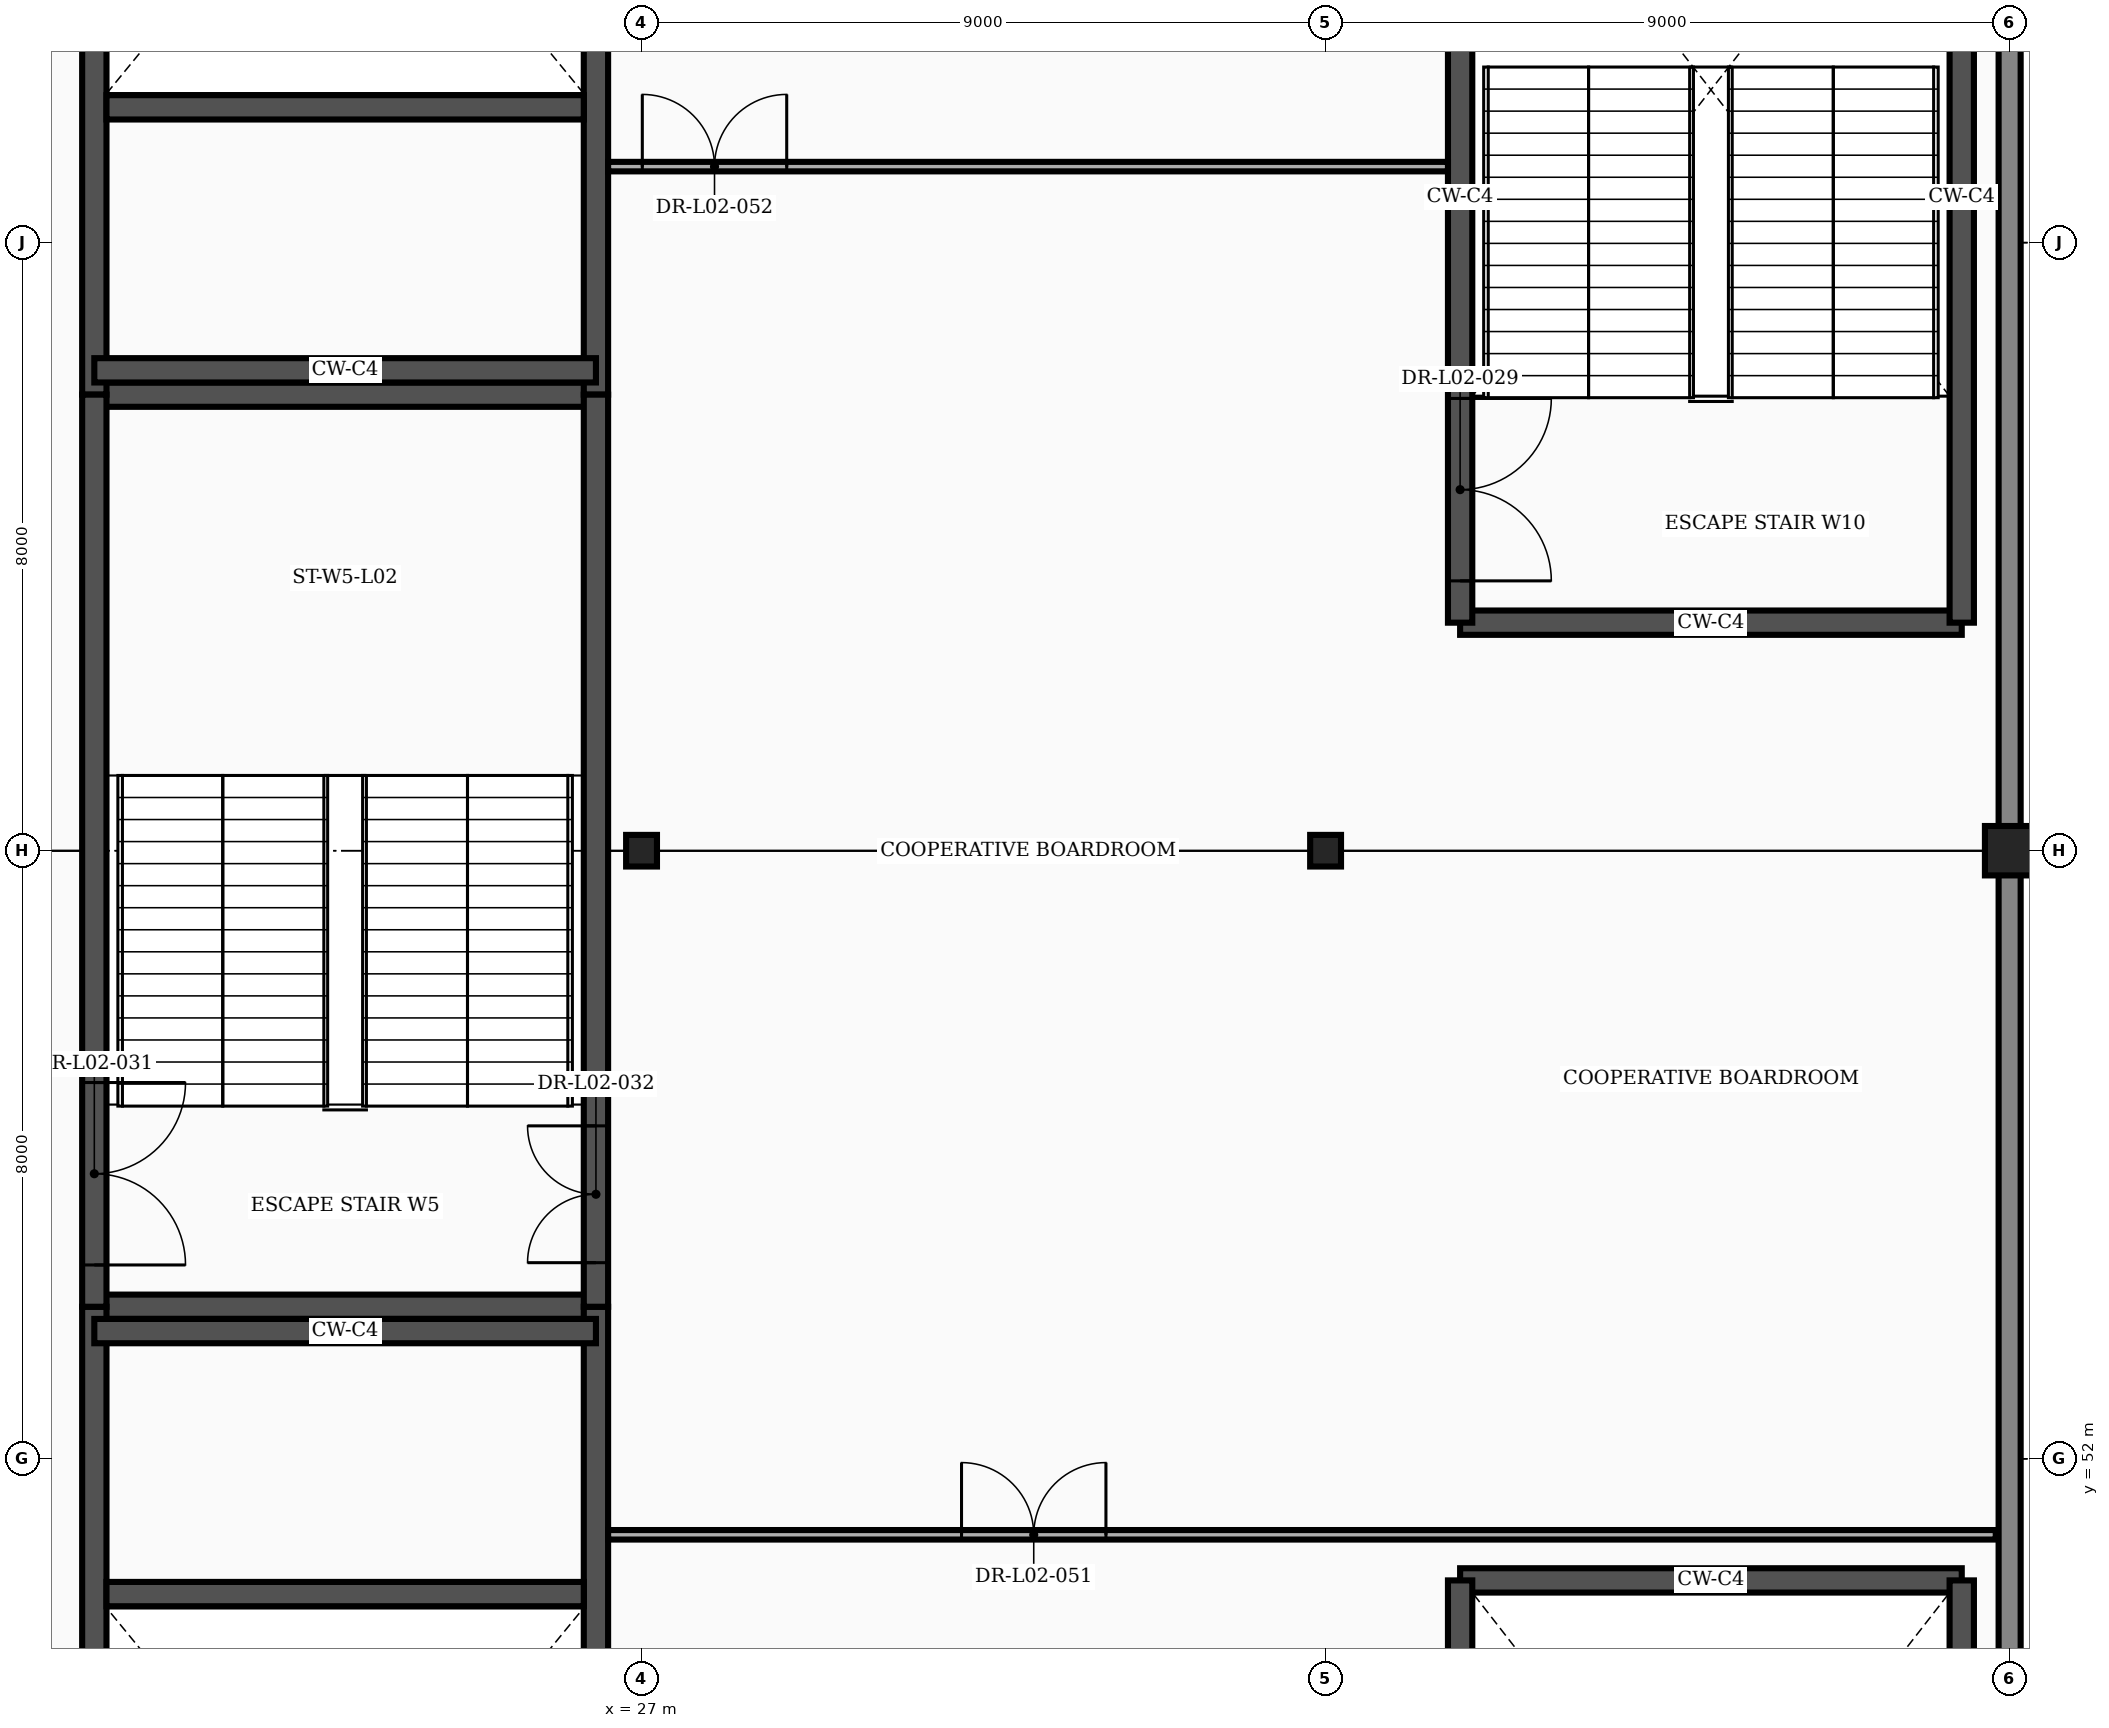
"""IFC4 building model, lengths in metres.
Left out: names, types, materials, properties, quantities, classifications, styles, units other than length and angle.
Written with IfcOpenShell. Run it as: python <this file> out.ifc"""

import sys

from ifc_helpers import new_model, si_unit, direction, frame, frame_2d, origin, origin_2d, place, context, subcontext, project, spatial, rectangle, i_section, extrude, element, fill, save


model = new_model("IFC4")
c1 = context("Model", 3, precision=1e-05, world=origin(), true_north=direction((0.0, 1.0)))
c2 = subcontext(c1, "Body", "Model", "MODEL_VIEW")
j1 = project(units=[si_unit("LENGTHUNIT", "METRE"), si_unit("PLANEANGLEUNIT", "RADIAN")], contexts=[c1])
p1 = place(None, origin())
s1 = spatial("IfcSite", under=j1, at=p1, CompositionType="ELEMENT")
p2 = place(p1, origin())
s2 = spatial("IfcBuilding", under=s1, at=p2, CompositionType="ELEMENT")
p3 = place(p2, frame((0.0, 0.0, 11.4)))
s3 = spatial("IfcBuildingStorey", under=s2, at=p3, CompositionType="ELEMENT", Elevation=11.4)
p4 = place(p3, frame((27.0, 60.0, 0.0), z_axis=(0.0, 0.0, 1.0), x_axis=(1.0, 0.0, 0.0)))
e1 = element("IfcColumn", 1, at=p4, inside=s3, PredefinedType="COLUMN", context=c2, shape_type="SweptSolid", body=[
    extrude(i_section(OverallWidth=0.406, OverallDepth=0.416, WebThickness=0.03, FlangeThickness=0.048, at=origin_2d()), origin(), (0.0, 0.0, 1.0), 5.4),
])
p5 = place(p3, frame((45.0, 60.0, 0.0), z_axis=(0.0, 0.0, 1.0), x_axis=(1.0, 0.0, 0.0)))
e2 = element("IfcColumn", 2, at=p5, inside=s3, PredefinedType="COLUMN", context=c2, shape_type="SweptSolid", body=[
    extrude(rectangle(XDim=0.65, YDim=0.65, at=origin_2d()), origin(), (0.0, 0.0, 1.0), 5.4),
])
p6 = place(p3, frame((36.0, 60.0, 0.0), z_axis=(0.0, 0.0, 1.0), x_axis=(1.0, 0.0, 0.0)))
e3 = element("IfcColumn", 3, at=p6, inside=s3, PredefinedType="COLUMN", context=c2, shape_type="SweptSolid", body=[
    extrude(i_section(OverallWidth=0.406, OverallDepth=0.416, WebThickness=0.03, FlangeThickness=0.048, at=origin_2d()), origin(), (0.0, 0.0, 1.0), 5.4),
])
for number, where, z_axis, x_axis in (
    (4, (45.0, 36.198, 0.0), (0.0, 0.0, 1.0), (0.0, 1.0, 0.0)),
    (5, (45.0, 60.317, 0.0), (0.0, 0.0, 1.0), (0.0, 1.0, 0.0)),
):
    element("IfcWall", number, at=place(p3, frame(where, z_axis=z_axis, x_axis=x_axis)), inside=s3, PredefinedType="STANDARD", context=c2, shape_type="SweptSolid", body=[
        extrude(rectangle(XDim=23.485, YDim=0.29, at=frame_2d((11.742, 0.0))), origin(), (0.0, 0.0, 1.0), 4.467),
    ])
p7 = place(p3, frame((19.8, 54.0, 0.0), z_axis=(0.0, 0.0, 1.0), x_axis=(1.0, 0.0, 0.0)))
e6 = element("IfcWall", 6, at=p7, inside=s3, PredefinedType="SHEAR", context=c2, shape_type="SweptSolid", body=[
    extrude(rectangle(XDim=6.6, YDim=0.32, at=frame_2d((3.3, 0.0))), origin(), (0.0, 0.0, 1.0), 5.15),
])
p8 = place(p3, frame((19.8, 39.4, 0.0), z_axis=(0.0, 0.0, 1.0), x_axis=(0.0, 1.0, 0.0)))
e7 = element("IfcWall", 7, at=p8, inside=s3, PredefinedType="SHEAR", context=c2, shape_type="SweptSolid", body=[
    extrude(rectangle(XDim=14.6, YDim=0.32, at=frame_2d((7.3, 0.0))), origin(), (0.0, 0.0, 1.0), 5.15),
])
p9 = place(p8, frame((0.55, 0.0, 0.0)))
e8 = element("IfcOpeningElement", 8, at=p9, cuts=e7, PredefinedType="OPENING", context=c2, shape_type="SweptSolid", body=[
    extrude(rectangle(XDim=2.4, YDim=2.25, at=frame_2d((1.2, 1.125))), frame((0.0, 0.172, 0.0), z_axis=(0.0, -1.0, 0.0), x_axis=(1.0, 0.0, 0.0)), (0.0, 0.0, 1.0), 0.344),
])
p10 = place(p3, frame((26.4, 39.4, 0.0), z_axis=(0.0, 0.0, 1.0), x_axis=(0.0, 1.0, 0.0)))
e9 = element("IfcWall", 9, at=p10, inside=s3, PredefinedType="SHEAR", context=c2, shape_type="SweptSolid", body=[
    extrude(rectangle(XDim=14.6, YDim=0.32, at=frame_2d((7.3, 0.0))), origin(), (0.0, 0.0, 1.0), 5.15),
])
p11 = place(p3, frame((19.96, 50.22, 0.0), z_axis=(0.0, 0.0, 1.0), x_axis=(1.0, 0.0, 0.0)))
e10 = element("IfcWall", 10, at=p11, inside=s3, PredefinedType="SHEAR", context=c2, shape_type="SweptSolid", body=[
    extrude(rectangle(XDim=6.28, YDim=0.32, at=frame_2d((3.14, 0.0))), origin(), (0.0, 0.0, 1.0), 5.15),
])
p12 = place(p3, frame((19.8, 66.0, 0.0), z_axis=(0.0, 0.0, 1.0), x_axis=(1.0, 0.0, 0.0)))
e11 = element("IfcWall", 11, at=p12, inside=s3, PredefinedType="SHEAR", context=c2, shape_type="SweptSolid", body=[
    extrude(rectangle(XDim=6.6, YDim=0.32, at=frame_2d((3.3, 0.0))), origin(), (0.0, 0.0, 1.0), 5.15),
])
p13 = place(p3, frame((19.8, 66.0, 0.0), z_axis=(0.0, 0.0, 1.0), x_axis=(0.0, 1.0, 0.0)))
e12 = element("IfcWall", 12, at=p13, inside=s3, PredefinedType="SHEAR", context=c2, shape_type="SweptSolid", body=[
    extrude(rectangle(XDim=14.6, YDim=0.32, at=frame_2d((7.3, 0.0))), origin(), (0.0, 0.0, 1.0), 5.15),
])
p14 = place(p13, frame((11.65, 0.0, 0.0)))
e13 = element("IfcOpeningElement", 13, at=p14, cuts=e12, PredefinedType="OPENING", context=c2, shape_type="SweptSolid", body=[
    extrude(rectangle(XDim=2.4, YDim=2.25, at=frame_2d((1.2, 1.125))), frame((0.0, 0.172, 0.0), z_axis=(0.0, -1.0, 0.0), x_axis=(1.0, 0.0, 0.0)), (0.0, 0.0, 1.0), 0.344),
])
p15 = place(p3, frame((26.4, 66.0, 0.0), z_axis=(0.0, 0.0, 1.0), x_axis=(0.0, 1.0, 0.0)))
e14 = element("IfcWall", 14, at=p15, inside=s3, PredefinedType="SHEAR", context=c2, shape_type="SweptSolid", body=[
    extrude(rectangle(XDim=14.6, YDim=0.32, at=frame_2d((7.3, 0.0))), origin(), (0.0, 0.0, 1.0), 5.15),
])
p16 = place(p3, frame((19.96, 69.78, 0.0), z_axis=(0.0, 0.0, 1.0), x_axis=(1.0, 0.0, 0.0)))
e15 = element("IfcWall", 15, at=p16, inside=s3, PredefinedType="SHEAR", context=c2, shape_type="SweptSolid", body=[
    extrude(rectangle(XDim=6.28, YDim=0.32, at=frame_2d((3.14, 0.0))), origin(), (0.0, 0.0, 1.0), 5.15),
])
p17 = place(p3, frame((37.77, 50.4, 0.0), z_axis=(0.0, 0.0, 1.0), x_axis=(1.0, 0.0, 0.0)))
e16 = element("IfcWall", 16, at=p17, inside=s3, PredefinedType="SHEAR", context=c2, shape_type="SweptSolid", body=[
    extrude(rectangle(XDim=6.6, YDim=0.32, at=frame_2d((3.3, 0.0))), origin(), (0.0, 0.0, 1.0), 5.15),
])
p18 = place(p3, frame((37.77, 39.2, 0.0), z_axis=(0.0, 0.0, 1.0), x_axis=(0.0, 1.0, 0.0)))
e17 = element("IfcWall", 17, at=p18, inside=s3, PredefinedType="SHEAR", context=c2, shape_type="SweptSolid", body=[
    extrude(rectangle(XDim=11.2, YDim=0.32, at=frame_2d((5.6, 0.0))), origin(), (0.0, 0.0, 1.0), 5.15),
])
p19 = place(p18, frame((0.55, 0.0, 0.0)))
e18 = element("IfcOpeningElement", 18, at=p19, cuts=e17, PredefinedType="OPENING", context=c2, shape_type="SweptSolid", body=[
    extrude(rectangle(XDim=2.4, YDim=2.25, at=frame_2d((1.2, 1.125))), frame((0.0, 0.172, 0.0), z_axis=(0.0, -1.0, 0.0), x_axis=(1.0, 0.0, 0.0)), (0.0, 0.0, 1.0), 0.344),
])
p20 = place(p3, frame((44.37, 39.2, 0.0), z_axis=(0.0, 0.0, 1.0), x_axis=(0.0, 1.0, 0.0)))
e19 = element("IfcWall", 19, at=p20, inside=s3, PredefinedType="SHEAR", context=c2, shape_type="SweptSolid", body=[
    extrude(rectangle(XDim=11.2, YDim=0.32, at=frame_2d((5.6, 0.0))), origin(), (0.0, 0.0, 1.0), 5.15),
])
p21 = place(p3, frame((37.77, 63.0, 0.0), z_axis=(0.0, 0.0, 1.0), x_axis=(1.0, 0.0, 0.0)))
e20 = element("IfcWall", 20, at=p21, inside=s3, PredefinedType="SHEAR", context=c2, shape_type="SweptSolid", body=[
    extrude(rectangle(XDim=6.6, YDim=0.32, at=frame_2d((3.3, 0.0))), origin(), (0.0, 0.0, 1.0), 5.15),
])
p22 = place(p3, frame((37.77, 63.0, 0.0), z_axis=(0.0, 0.0, 1.0), x_axis=(0.0, 1.0, 0.0)))
e21 = element("IfcWall", 21, at=p22, inside=s3, PredefinedType="SHEAR", context=c2, shape_type="SweptSolid", body=[
    extrude(rectangle(XDim=11.2, YDim=0.32, at=frame_2d((5.6, 0.0))), origin(), (0.0, 0.0, 1.0), 5.15),
])
p23 = place(p22, frame((0.55, 0.0, 0.0)))
e22 = element("IfcOpeningElement", 22, at=p23, cuts=e21, PredefinedType="OPENING", context=c2, shape_type="SweptSolid", body=[
    extrude(rectangle(XDim=2.4, YDim=2.25, at=frame_2d((1.2, 1.125))), frame((0.0, 0.172, 0.0), z_axis=(0.0, -1.0, 0.0), x_axis=(1.0, 0.0, 0.0)), (0.0, 0.0, 1.0), 0.344),
])
p24 = place(p3, frame((44.37, 63.0, 0.0), z_axis=(0.0, 0.0, 1.0), x_axis=(0.0, 1.0, 0.0)))
e23 = element("IfcWall", 23, at=p24, inside=s3, PredefinedType="SHEAR", context=c2, shape_type="SweptSolid", body=[
    extrude(rectangle(XDim=11.2, YDim=0.32, at=frame_2d((5.6, 0.0))), origin(), (0.0, 0.0, 1.0), 5.15),
])
for number, where, z_axis, x_axis in (
    (24, (19.8, 53.68, 0.0), (0.0, 0.0, 1.0), (1.0, 0.0, 0.0)),
    (25, (19.8, 66.32, 0.0), (0.0, 0.0, 1.0), (1.0, 0.0, 0.0)),
):
    element("IfcWall", number, at=place(p3, frame(where, z_axis=z_axis, x_axis=x_axis)), inside=s3, PredefinedType="SHEAR", context=c2, shape_type="SweptSolid", body=[
        extrude(rectangle(XDim=6.6, YDim=0.32, at=frame_2d((3.3, 0.0))), origin(), (0.0, 0.0, 1.0), 5.15),
    ])
p25 = place(p3, frame((19.8, 54.0, 0.0), z_axis=(0.0, 0.0, 1.0), x_axis=(0.0, 1.0, 0.0)))
e26 = element("IfcWall", 26, at=p25, inside=s3, PredefinedType="SHEAR", context=c2, shape_type="SweptSolid", body=[
    extrude(rectangle(XDim=12.0, YDim=0.32, at=frame_2d((6.0, 0.0))), origin(), (0.0, 0.0, 1.0), 5.15),
])
p26 = place(p25, frame((0.55, 0.0, 0.0)))
e27 = element("IfcOpeningElement", 27, at=p26, cuts=e26, PredefinedType="OPENING", context=c2, shape_type="SweptSolid", body=[
    extrude(rectangle(XDim=2.4, YDim=2.25, at=frame_2d((1.2, 1.125))), frame((0.0, 0.172, 0.0), z_axis=(0.0, -1.0, 0.0), x_axis=(1.0, 0.0, 0.0)), (0.0, 0.0, 1.0), 0.344),
])
p27 = place(p3, frame((26.4, 54.0, 0.0), z_axis=(0.0, 0.0, 1.0), x_axis=(0.0, 1.0, 0.0)))
e28 = element("IfcWall", 28, at=p27, inside=s3, PredefinedType="SHEAR", context=c2, shape_type="SweptSolid", body=[
    extrude(rectangle(XDim=12.0, YDim=0.32, at=frame_2d((6.0, 0.0))), origin(), (0.0, 0.0, 1.0), 5.15),
])
p28 = place(p27, frame((0.58, 0.0, 0.0)))
e29 = element("IfcOpeningElement", 29, at=p28, cuts=e28, PredefinedType="OPENING", context=c2, shape_type="SweptSolid", body=[
    extrude(rectangle(XDim=1.8, YDim=2.25, at=frame_2d((0.9, 1.125))), frame((0.0, 0.172, 0.0), z_axis=(0.0, -1.0, 0.0), x_axis=(1.0, 0.0, 0.0)), (0.0, 0.0, 1.0), 0.344),
])
p29 = place(p3, frame((26.56, 51.0, 0.0), z_axis=(0.0, 0.0, 1.0), x_axis=(1.0, 0.0, 0.0)))
e30 = element("IfcWall", 30, at=p29, inside=s3, PredefinedType="PARTITIONING", context=c2, shape_type="SweptSolid", body=[
    extrude(rectangle(XDim=18.257, YDim=0.125, at=frame_2d((9.129, 0.0))), origin(), (0.0, 0.0, 1.0), 5.15),
])
p30 = place(p29, frame((4.65, 0.0, 0.0)))
e31 = element("IfcOpeningElement", 31, at=p30, cuts=e30, PredefinedType="OPENING", context=c2, shape_type="SweptSolid", body=[
    extrude(rectangle(XDim=1.9, YDim=2.35, at=frame_2d((0.95, 1.175))), frame((0.0, 0.074, 0.0), z_axis=(0.0, -1.0, 0.0), x_axis=(1.0, 0.0, 0.0)), (0.0, 0.0, 1.0), 0.149),
])
p31 = place(p3, frame((26.56, 69.0, 0.0), z_axis=(0.0, 0.0, 1.0), x_axis=(1.0, 0.0, 0.0)))
e32 = element("IfcWall", 32, at=p31, inside=s3, PredefinedType="PARTITIONING", context=c2, shape_type="SweptSolid", body=[
    extrude(rectangle(XDim=11.05, YDim=0.125, at=frame_2d((5.525, 0.0))), origin(), (0.0, 0.0, 1.0), 5.15),
])
p32 = place(p31, frame((0.45, 0.0, 0.0)))
e33 = element("IfcOpeningElement", 33, at=p32, cuts=e32, PredefinedType="OPENING", context=c2, shape_type="SweptSolid", body=[
    extrude(rectangle(XDim=1.9, YDim=2.35, at=frame_2d((0.95, 1.175))), frame((0.0, 0.074, 0.0), z_axis=(0.0, -1.0, 0.0), x_axis=(1.0, 0.0, 0.0)), (0.0, 0.0, 1.0), 0.149),
])
p33 = place(p23, frame((2.4, 0.0, 0.0), z_axis=(0.0, 0.0, 1.0), x_axis=(-1.0, 0.0, 0.0)))
e34 = element("IfcDoor", 34, at=p33, inside=s3, OperationType="DOUBLE_DOOR_SINGLE_SWING", PredefinedType="DOOR", context=c2, shape_type="SweptSolid", body=[
    extrude(rectangle(XDim=2.4, YDim=2.25, at=frame_2d((1.2, 1.125))), frame((0.0, 0.025, 0.0), z_axis=(0.0, -1.0, 0.0), x_axis=(1.0, 0.0, 0.0)), (0.0, 0.0, 1.0), 0.05),
])
fill(e22, e34)
p34 = place(p26, frame((2.4, 0.0, 0.0), z_axis=(0.0, 0.0, 1.0), x_axis=(-1.0, 0.0, 0.0)))
e35 = element("IfcDoor", 35, at=p34, inside=s3, OperationType="DOUBLE_DOOR_SINGLE_SWING", PredefinedType="DOOR", context=c2, shape_type="SweptSolid", body=[
    extrude(rectangle(XDim=2.4, YDim=2.25, at=frame_2d((1.2, 1.125))), frame((0.0, 0.025, 0.0), z_axis=(0.0, -1.0, 0.0), x_axis=(1.0, 0.0, 0.0)), (0.0, 0.0, 1.0), 0.05),
])
fill(e27, e35)
p35 = place(p28, origin())
e36 = element("IfcDoor", 36, at=p35, inside=s3, OperationType="DOUBLE_DOOR_SINGLE_SWING", PredefinedType="DOOR", context=c2, shape_type="SweptSolid", body=[
    extrude(rectangle(XDim=1.8, YDim=2.25, at=frame_2d((0.9, 1.125))), frame((0.0, 0.025, 0.0), z_axis=(0.0, -1.0, 0.0), x_axis=(1.0, 0.0, 0.0)), (0.0, 0.0, 1.0), 0.05),
])
fill(e29, e36)
p36 = place(p30, origin())
e37 = element("IfcDoor", 37, at=p36, inside=s3, OperationType="DOUBLE_DOOR_SINGLE_SWING", PredefinedType="DOOR", context=c2, shape_type="SweptSolid", body=[
    extrude(rectangle(XDim=1.9, YDim=2.35, at=frame_2d((0.95, 1.175))), frame((0.0, 0.025, 0.0), z_axis=(0.0, -1.0, 0.0), x_axis=(1.0, 0.0, 0.0)), (0.0, 0.0, 1.0), 0.05),
])
fill(e31, e37)
p37 = place(p32, origin())
e38 = element("IfcDoor", 38, at=p37, inside=s3, OperationType="DOUBLE_DOOR_SINGLE_SWING", PredefinedType="DOOR", context=c2, shape_type="SweptSolid", body=[
    extrude(rectangle(XDim=1.9, YDim=2.35, at=frame_2d((0.95, 1.175))), frame((0.0, 0.025, 0.0), z_axis=(0.0, -1.0, 0.0), x_axis=(1.0, 0.0, 0.0)), (0.0, 0.0, 1.0), 0.05),
])
fill(e33, e38)
save(model, sys.argv[1])
